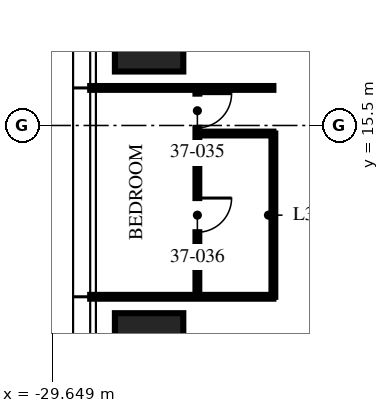
"""IFC4 building model, lengths in metres.
Left out: names, types, materials, properties, quantities, classifications, styles, units other than length and angle.
Written with IfcOpenShell. Run it as: python <this file> out.ifc"""

import sys

from ifc_helpers import new_model, si_unit, direction, frame, frame_2d, origin, origin_2d, place, context, subcontext, project, spatial, rectangle, extrude, element, fill, save


model = new_model("IFC4")
c1 = context("Model", 3, precision=1e-05, world=origin(), true_north=direction((0.0, 1.0)))
c2 = subcontext(c1, "Body", "Model", "MODEL_VIEW")
j1 = project(units=[si_unit("LENGTHUNIT", "METRE"), si_unit("PLANEANGLEUNIT", "RADIAN")], contexts=[c1])
p1 = place(None, origin())
s1 = spatial("IfcSite", under=j1, at=p1, CompositionType="ELEMENT")
p2 = place(p1, origin())
s2 = spatial("IfcBuilding", under=s1, at=p2, CompositionType="ELEMENT")
p3 = place(p2, frame((0.0, 0.0, 148.5)))
s3 = spatial("IfcBuildingStorey", under=s2, at=p3, CompositionType="ELEMENT", Elevation=148.5)
for number, where, z_axis, x_axis in (
    (1, (-27.1, 9.16, 0.0), (0.0, 0.0, 1.0), (0.0, 1.0, 0.0)),
    (2, (-27.1, 18.32, 0.0), (0.0, 0.0, 1.0), (0.0, 1.0, 0.0)),
):
    element("IfcColumn", number, at=place(p3, frame(where, z_axis=z_axis, x_axis=x_axis)), inside=s3, PredefinedType="COLUMN", context=c2, shape_type="SweptSolid", body=[
        extrude(rectangle(XDim=2.8, YDim=1.8, at=origin_2d()), origin(), (0.0, 0.0, 1.0), 3.75),
    ])
for number, where, z_axis, x_axis in (
    (3, (-23.83, 16.488, 0.0), (0.0, 0.0, 1.0), (-1.0, 0.0, 0.0)),
    (4, (-23.83, 10.992, 0.0), (0.0, 0.0, 1.0), (-1.0, 0.0, 0.0)),
):
    element("IfcWall", number, at=place(p3, frame(where, z_axis=z_axis, x_axis=x_axis)), inside=s3, PredefinedType="PARTITIONING", context=c2, shape_type="SweptSolid", body=[
        extrude(rectangle(XDim=4.82, YDim=0.1, at=frame_2d((2.41, 0.0))), origin(), (0.0, 0.0, 1.0), 2.81),
    ])
p4 = place(p3, frame((-25.83, 16.488, 0.0), z_axis=(0.0, 0.0, 1.0), x_axis=(0.0, -1.0, 0.0)))
e5 = element("IfcWall", 5, at=p4, inside=s3, PredefinedType="PARTITIONING", context=c2, shape_type="SweptSolid", body=[
    extrude(rectangle(XDim=5.496, YDim=0.1, at=frame_2d((2.748, 0.0))), origin(), (0.0, 0.0, 1.0), 2.81),
])
p5 = place(p4, frame((0.15, 0.0, 0.0)))
e6 = element("IfcOpeningElement", 6, at=p5, cuts=e5, PredefinedType="OPENING", context=c2, shape_type="SweptSolid", body=[
    extrude(rectangle(XDim=0.9, YDim=2.1, at=frame_2d((0.45, 1.05))), frame((0.0, 0.06, 0.0), z_axis=(0.0, -1.0, 0.0), x_axis=(1.0, 0.0, 0.0)), (0.0, 0.0, 1.0), 0.12),
])
p6 = place(p4, frame((2.898, 0.0, 0.0)))
e7 = element("IfcOpeningElement", 7, at=p6, cuts=e5, PredefinedType="OPENING", context=c2, shape_type="SweptSolid", body=[
    extrude(rectangle(XDim=0.9, YDim=2.1, at=frame_2d((0.45, 1.05))), frame((0.0, 0.06, 0.0), z_axis=(0.0, -1.0, 0.0), x_axis=(1.0, 0.0, 0.0)), (0.0, 0.0, 1.0), 0.12),
])
p7 = place(p3, frame((-23.83, 15.288, 0.0), z_axis=(0.0, 0.0, 1.0), x_axis=(-1.0, 0.0, 0.0)))
e8 = element("IfcWall", 8, at=p7, inside=s3, PredefinedType="PARTITIONING", context=c2, shape_type="SweptSolid", body=[
    extrude(rectangle(XDim=2.0, YDim=0.1, at=frame_2d((1.0, 0.0))), origin(), (0.0, 0.0, 1.0), 3.5),
])
p8 = place(p3, frame((-23.83, 15.288, 0.0), z_axis=(0.0, 0.0, 1.0), x_axis=(0.0, -1.0, 0.0)))
e9 = element("IfcWall", 9, at=p8, inside=s3, PredefinedType="PARTITIONING", context=c2, shape_type="SweptSolid", body=[
    extrude(rectangle(XDim=4.296, YDim=0.1, at=frame_2d((2.148, 0.0))), origin(), (0.0, 0.0, 1.0), 2.81),
])
p9 = place(p5, origin())
e10 = element("IfcDoor", 10, at=p9, inside=s3, OperationType="SINGLE_SWING_LEFT", PredefinedType="DOOR", context=c2, shape_type="SweptSolid", body=[
    extrude(rectangle(XDim=0.9, YDim=2.1, at=frame_2d((0.45, 1.05))), frame((0.0, 0.025, 0.0), z_axis=(0.0, -1.0, 0.0), x_axis=(1.0, 0.0, 0.0)), (0.0, 0.0, 1.0), 0.05),
])
fill(e6, e10)
p10 = place(p6, origin())
e11 = element("IfcDoor", 11, at=p10, inside=s3, OperationType="SINGLE_SWING_LEFT", PredefinedType="DOOR", context=c2, shape_type="SweptSolid", body=[
    extrude(rectangle(XDim=0.9, YDim=2.1, at=frame_2d((0.45, 1.05))), frame((0.0, 0.025, 0.0), z_axis=(0.0, -1.0, 0.0), x_axis=(1.0, 0.0, 0.0)), (0.0, 0.0, 1.0), 0.05),
])
fill(e7, e11)
save(model, sys.argv[1])
